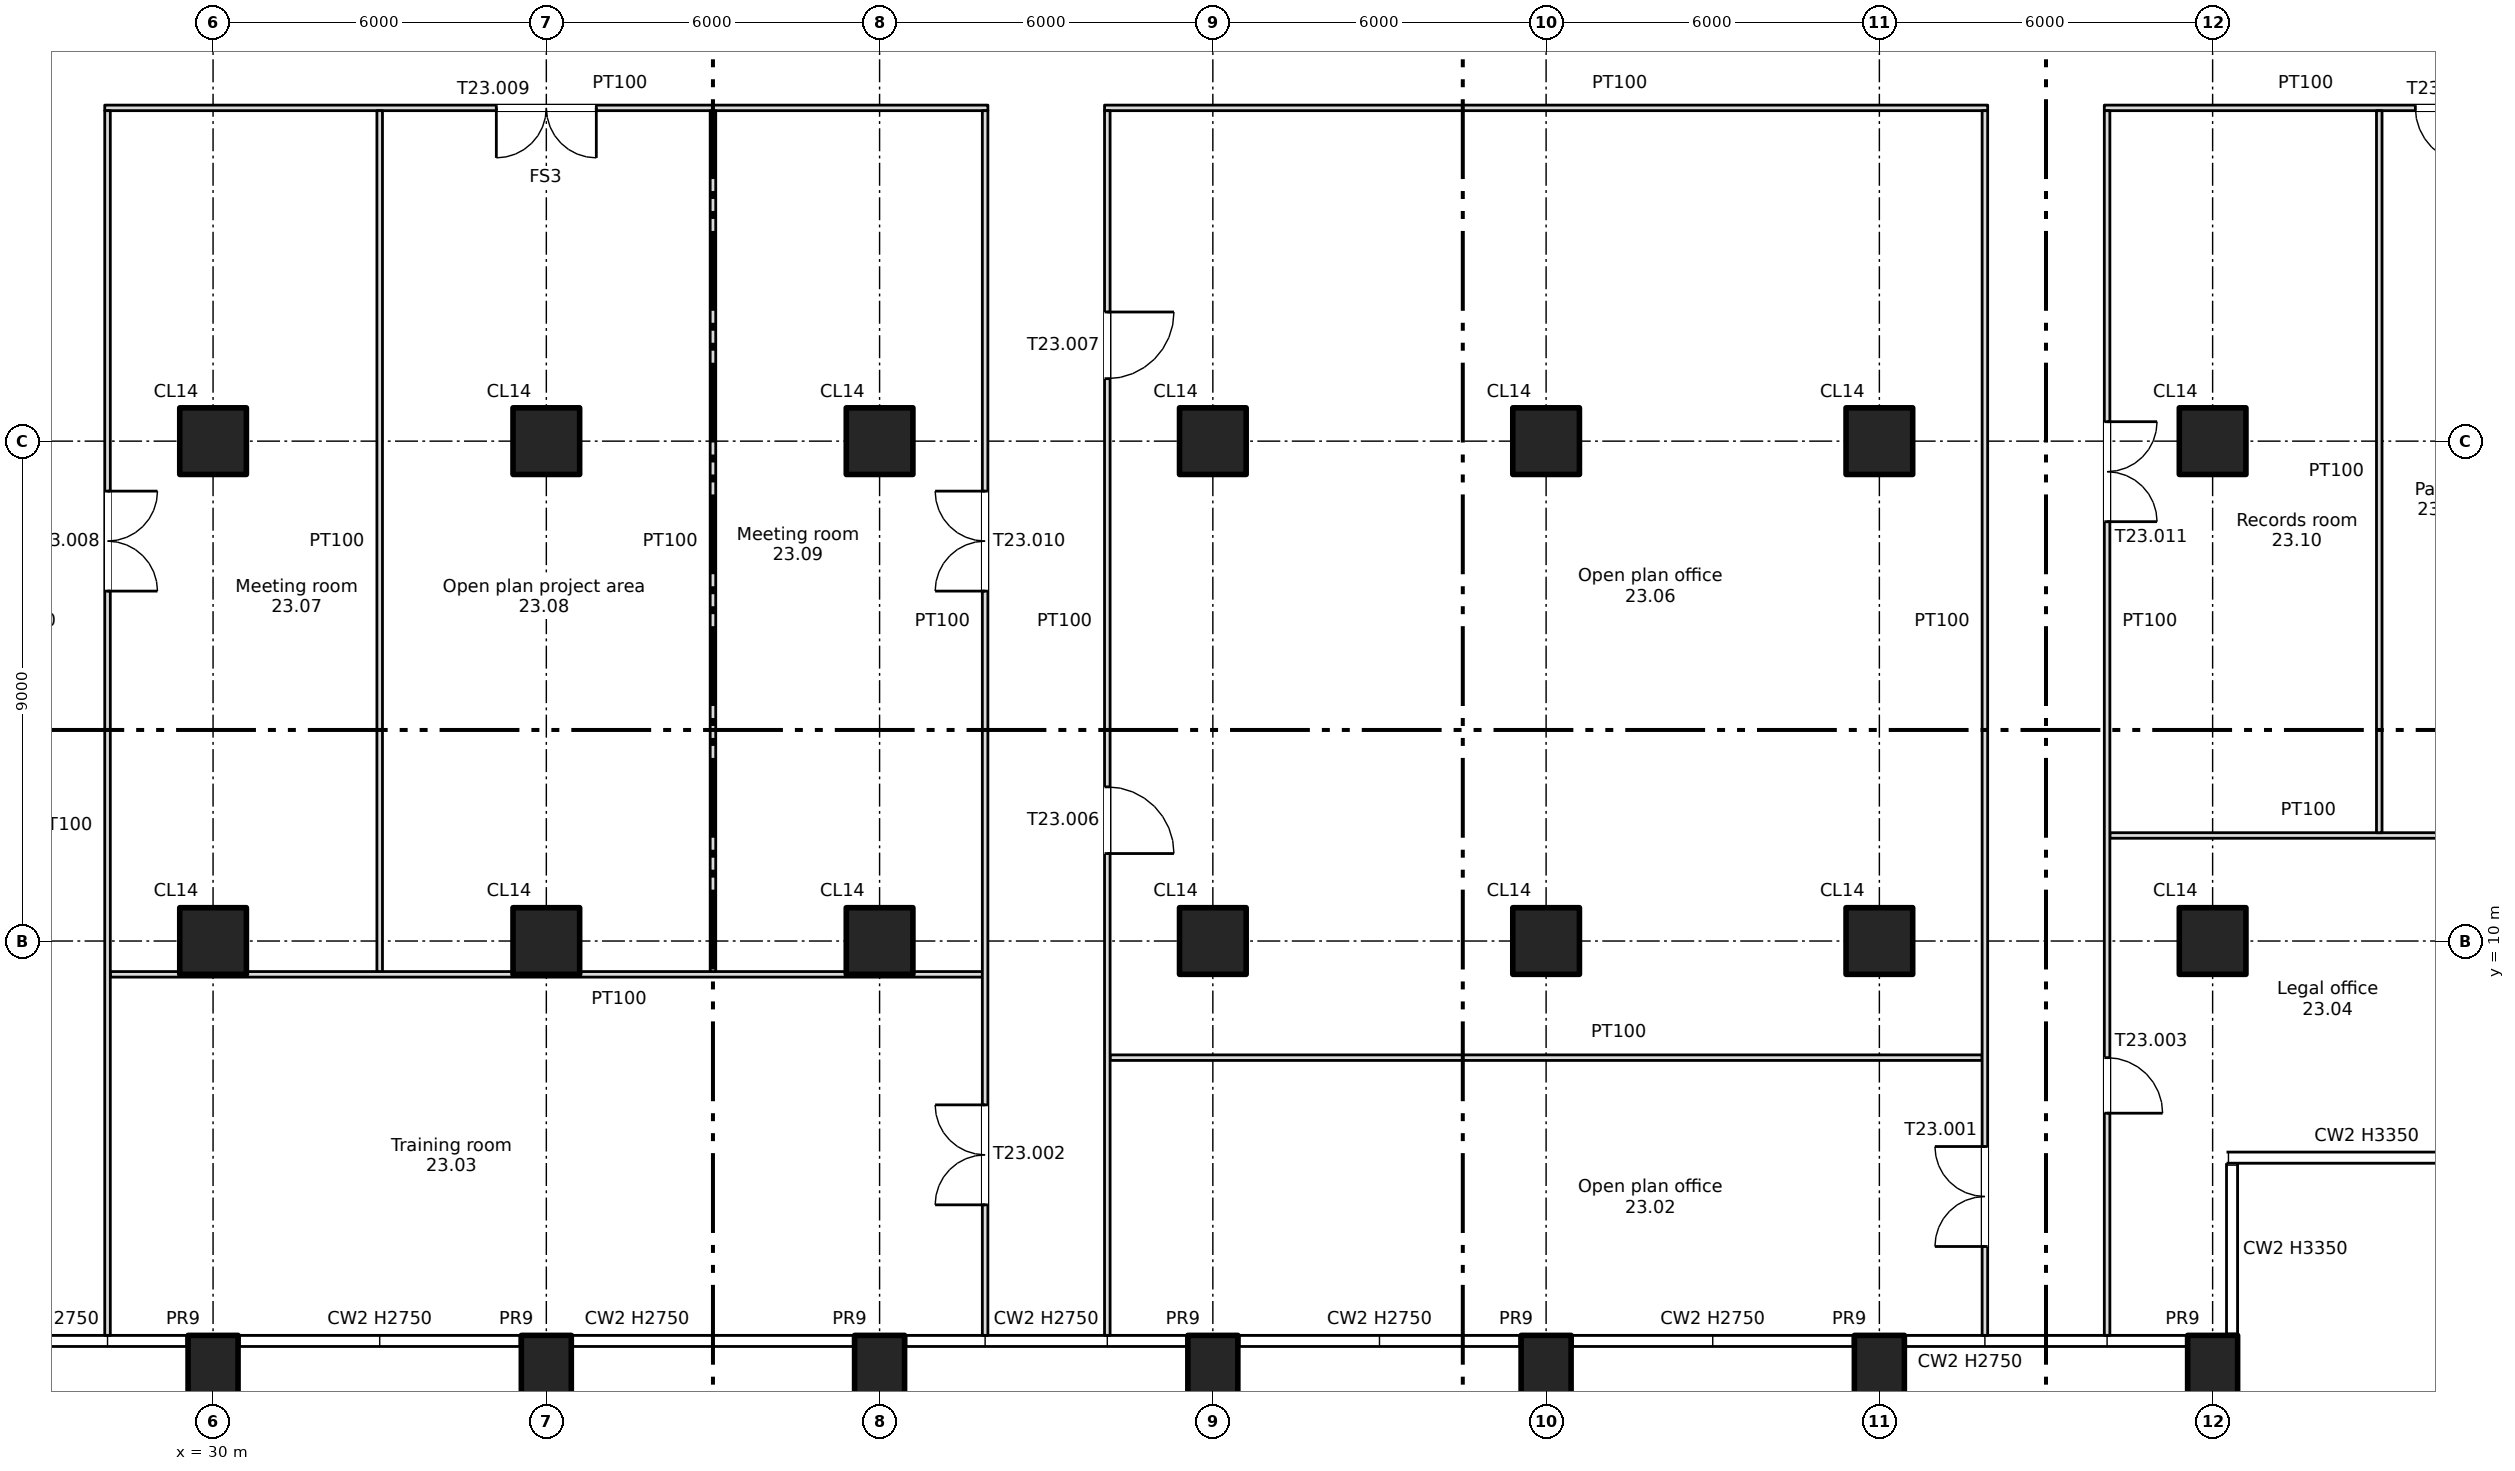
"""IFC4 building model, lengths in metres.
Left out: names, types, materials, properties, quantities, classifications, styles, units other than length and angle.
Written with IfcOpenShell. Run it as: python <this file> out.ifc"""

import sys

from ifc_helpers import new_model, si_unit, direction, frame, frame_2d, origin, origin_2d, place, context, subcontext, project, spatial, rectangle, extrude, element, fill, save


model = new_model("IFC4")
c1 = context("Model", 3, precision=1e-05, world=origin(), true_north=direction((0.0, 1.0)))
c2 = subcontext(c1, "Body", "Model", "MODEL_VIEW")
j1 = project(units=[si_unit("LENGTHUNIT", "METRE"), si_unit("PLANEANGLEUNIT", "RADIAN")], contexts=[c1])
p1 = place(None, origin())
s1 = spatial("IfcSite", under=j1, at=p1, CompositionType="ELEMENT")
p2 = place(p1, origin())
s2 = spatial("IfcBuilding", under=s1, at=p2, CompositionType="ELEMENT")
p3 = place(p2, frame((0.0, 0.0, 151.25)))
s3 = spatial("IfcBuildingStorey", under=s2, at=p3, CompositionType="ELEMENT", Elevation=151.25)
for number, where, z_axis, x_axis in (
    (1, (30.0, 2.2, -0.4), (0.0, 0.0, 1.0), (1.0, 0.0, 0.0)),
    (2, (36.0, 2.2, -0.4), (0.0, 0.0, 1.0), (1.0, 0.0, 0.0)),
    (3, (42.0, 2.2, -0.4), (0.0, 0.0, 1.0), (1.0, 0.0, 0.0)),
    (4, (48.0, 2.2, -0.4), (0.0, 0.0, 1.0), (1.0, 0.0, 0.0)),
    (5, (54.0, 2.2, -0.4), (0.0, 0.0, 1.0), (1.0, 0.0, 0.0)),
    (6, (60.0, 2.2, -0.4), (0.0, 0.0, 1.0), (1.0, 0.0, 0.0)),
    (7, (66.0, 2.2, -0.4), (0.0, 0.0, 1.0), (1.0, 0.0, 0.0)),
):
    element("IfcColumn", number, at=place(p3, frame(where, z_axis=z_axis, x_axis=x_axis)), inside=s3, PredefinedType="COLUMN", context=c2, shape_type="SweptSolid", body=[
        extrude(rectangle(XDim=0.9, YDim=1.4, at=origin_2d()), origin(), (0.0, 0.0, 1.0), 3.75),
    ])
for number, where, z_axis, x_axis in (
    (8, (30.0, 10.0, 0.0), (0.0, 0.0, 1.0), (1.0, 0.0, 0.0)),
    (9, (30.0, 19.0, 0.0), (0.0, 0.0, 1.0), (1.0, 0.0, 0.0)),
    (10, (36.0, 10.0, 0.0), (0.0, 0.0, 1.0), (1.0, 0.0, 0.0)),
    (11, (36.0, 19.0, 0.0), (0.0, 0.0, 1.0), (1.0, 0.0, 0.0)),
    (12, (42.0, 10.0, 0.0), (0.0, 0.0, 1.0), (1.0, 0.0, 0.0)),
    (13, (42.0, 19.0, 0.0), (0.0, 0.0, 1.0), (1.0, 0.0, 0.0)),
    (14, (48.0, 10.0, 0.0), (0.0, 0.0, 1.0), (1.0, 0.0, 0.0)),
    (15, (48.0, 19.0, 0.0), (0.0, 0.0, 1.0), (1.0, 0.0, 0.0)),
    (16, (54.0, 10.0, 0.0), (0.0, 0.0, 1.0), (1.0, 0.0, 0.0)),
    (17, (54.0, 19.0, 0.0), (0.0, 0.0, 1.0), (1.0, 0.0, 0.0)),
    (18, (60.0, 10.0, 0.0), (0.0, 0.0, 1.0), (1.0, 0.0, 0.0)),
    (19, (60.0, 19.0, 0.0), (0.0, 0.0, 1.0), (1.0, 0.0, 0.0)),
    (20, (66.0, 10.0, 0.0), (0.0, 0.0, 1.0), (1.0, 0.0, 0.0)),
    (21, (66.0, 19.0, 0.0), (0.0, 0.0, 1.0), (1.0, 0.0, 0.0)),
):
    element("IfcColumn", number, at=place(p3, frame(where, z_axis=z_axis, x_axis=x_axis)), inside=s3, PredefinedType="COLUMN", context=c2, shape_type="SweptSolid", body=[
        extrude(rectangle(XDim=1.2, YDim=1.2, at=origin_2d()), origin(), (0.0, 0.0, 1.0), 3.35),
    ])
for number, where, z_axis, x_axis in (
    (22, (46.15, 7.9, 0.0), (0.0, 0.0, 1.0), (1.0, 0.0, 0.0)),
    (23, (28.15, 9.4, 0.0), (0.0, 0.0, 1.0), (1.0, 0.0, 0.0)),
):
    element("IfcWall", number, at=place(p3, frame(where, z_axis=z_axis, x_axis=x_axis)), inside=s3, PredefinedType="PARTITIONING", context=c2, shape_type="SweptSolid", body=[
        extrude(rectangle(XDim=15.7, YDim=0.1, at=frame_2d((7.85, 0.0))), origin(), (0.0, 0.0, 1.0), 3.35),
    ])
p4 = place(p3, frame((64.15, 11.9, 0.0), z_axis=(0.0, 0.0, 1.0), x_axis=(1.0, 0.0, 0.0)))
e24 = element("IfcWall", 24, at=p4, inside=s3, PredefinedType="PARTITIONING", context=c2, shape_type="SweptSolid", body=[
    extrude(rectangle(XDim=7.15, YDim=0.1, at=frame_2d((3.575, 0.0))), origin(), (0.0, 0.0, 1.0), 3.35),
])
p5 = place(p3, frame((28.05, 25.0, 0.0), z_axis=(0.0, 0.0, 1.0), x_axis=(1.0, 0.0, 0.0)))
e25 = element("IfcWall", 25, at=p5, inside=s3, PredefinedType="PARTITIONING", context=c2, shape_type="SweptSolid", body=[
    extrude(rectangle(XDim=15.9, YDim=0.1, at=frame_2d((7.95, 0.0))), origin(), (0.0, 0.0, 1.0), 3.35),
])
p6 = place(p5, frame((7.05, 0.0, 0.0)))
e26 = element("IfcOpeningElement", 26, at=p6, cuts=e25, PredefinedType="OPENING", context=c2, shape_type="SweptSolid", body=[
    extrude(rectangle(XDim=1.8, YDim=2.1, at=frame_2d((0.9, 1.05))), frame((0.0, 0.06, 0.0), z_axis=(0.0, -1.0, 0.0), x_axis=(1.0, 0.0, 0.0)), (0.0, 0.0, 1.0), 0.12),
])
p7 = place(p3, frame((46.05, 25.0, 0.0), z_axis=(0.0, 0.0, 1.0), x_axis=(1.0, 0.0, 0.0)))
e27 = element("IfcWall", 27, at=p7, inside=s3, PredefinedType="PARTITIONING", context=c2, shape_type="SweptSolid", body=[
    extrude(rectangle(XDim=15.9, YDim=0.1, at=frame_2d((7.95, 0.0))), origin(), (0.0, 0.0, 1.0), 3.35),
])
p8 = place(p3, frame((64.05, 25.0, 0.0), z_axis=(0.0, 0.0, 1.0), x_axis=(1.0, 0.0, 0.0)))
e28 = element("IfcWall", 28, at=p8, inside=s3, PredefinedType="PARTITIONING", context=c2, shape_type="SweptSolid", body=[
    extrude(rectangle(XDim=7.25, YDim=0.1, at=frame_2d((3.625, 0.0))), origin(), (0.0, 0.0, 1.0), 3.35),
])
p9 = place(p8, frame((5.6, 0.0, 0.0)))
e29 = element("IfcOpeningElement", 29, at=p9, cuts=e28, PredefinedType="OPENING", context=c2, shape_type="SweptSolid", body=[
    extrude(rectangle(XDim=1.0, YDim=2.1, at=frame_2d((0.5, 1.05))), frame((0.0, 0.06, 0.0), z_axis=(0.0, -1.0, 0.0), x_axis=(1.0, 0.0, 0.0)), (0.0, 0.0, 1.0), 0.12),
])
p10 = place(p3, frame((28.1, 2.9, 0.0), z_axis=(0.0, 0.0, 1.0), x_axis=(0.0, 1.0, 0.0)))
e30 = element("IfcWall", 30, at=p10, inside=s3, PredefinedType="PARTITIONING", context=c2, shape_type="SweptSolid", body=[
    extrude(rectangle(XDim=22.05, YDim=0.1, at=frame_2d((11.025, 0.0))), origin(), (0.0, 0.0, 1.0), 3.35),
])
p11 = place(p10, frame((13.4, 0.0, 0.0)))
e31 = element("IfcOpeningElement", 31, at=p11, cuts=e30, PredefinedType="OPENING", context=c2, shape_type="SweptSolid", body=[
    extrude(rectangle(XDim=1.8, YDim=2.1, at=frame_2d((0.9, 1.05))), frame((0.0, 0.06, 0.0), z_axis=(0.0, -1.0, 0.0), x_axis=(1.0, 0.0, 0.0)), (0.0, 0.0, 1.0), 0.12),
])
for number, where, z_axis, x_axis in (
    (32, (33.0, 9.45, 0.0), (0.0, 0.0, 1.0), (0.0, 1.0, 0.0)),
    (33, (39.0, 9.45, 0.0), (0.0, 0.0, 1.0), (0.0, 1.0, 0.0)),
):
    element("IfcWall", number, at=place(p3, frame(where, z_axis=z_axis, x_axis=x_axis)), inside=s3, PredefinedType="PARTITIONING", context=c2, shape_type="SweptSolid", body=[
        extrude(rectangle(XDim=15.5, YDim=0.1, at=frame_2d((7.75, 0.0))), origin(), (0.0, 0.0, 1.0), 3.35),
    ])
p12 = place(p3, frame((43.9, 2.9, 0.0), z_axis=(0.0, 0.0, 1.0), x_axis=(0.0, 1.0, 0.0)))
e34 = element("IfcWall", 34, at=p12, inside=s3, PredefinedType="PARTITIONING", context=c2, shape_type="SweptSolid", body=[
    extrude(rectangle(XDim=22.05, YDim=0.1, at=frame_2d((11.025, 0.0))), origin(), (0.0, 0.0, 1.0), 3.35),
])
p13 = place(p12, frame((2.35, 0.0, 0.0)))
e35 = element("IfcOpeningElement", 35, at=p13, cuts=e34, PredefinedType="OPENING", context=c2, shape_type="SweptSolid", body=[
    extrude(rectangle(XDim=1.8, YDim=2.1, at=frame_2d((0.9, 1.05))), frame((0.0, 0.06, 0.0), z_axis=(0.0, -1.0, 0.0), x_axis=(1.0, 0.0, 0.0)), (0.0, 0.0, 1.0), 0.12),
])
p14 = place(p12, frame((13.4, 0.0, 0.0)))
e36 = element("IfcOpeningElement", 36, at=p14, cuts=e34, PredefinedType="OPENING", context=c2, shape_type="SweptSolid", body=[
    extrude(rectangle(XDim=1.8, YDim=2.1, at=frame_2d((0.9, 1.05))), frame((0.0, 0.06, 0.0), z_axis=(0.0, -1.0, 0.0), x_axis=(1.0, 0.0, 0.0)), (0.0, 0.0, 1.0), 0.12),
])
p15 = place(p3, frame((46.1, 2.9, 0.0), z_axis=(0.0, 0.0, 1.0), x_axis=(0.0, 1.0, 0.0)))
e37 = element("IfcWall", 37, at=p15, inside=s3, PredefinedType="PARTITIONING", context=c2, shape_type="SweptSolid", body=[
    extrude(rectangle(XDim=22.05, YDim=0.1, at=frame_2d((11.025, 0.0))), origin(), (0.0, 0.0, 1.0), 3.35),
])
p16 = place(p15, frame((8.675, 0.0, 0.0)))
e38 = element("IfcOpeningElement", 38, at=p16, cuts=e37, PredefinedType="OPENING", context=c2, shape_type="SweptSolid", body=[
    extrude(rectangle(XDim=1.2, YDim=2.1, at=frame_2d((0.6, 1.05))), frame((0.0, 0.06, 0.0), z_axis=(0.0, -1.0, 0.0), x_axis=(1.0, 0.0, 0.0)), (0.0, 0.0, 1.0), 0.12),
])
p17 = place(p15, frame((17.225, 0.0, 0.0)))
e39 = element("IfcOpeningElement", 39, at=p17, cuts=e37, PredefinedType="OPENING", context=c2, shape_type="SweptSolid", body=[
    extrude(rectangle(XDim=1.2, YDim=2.1, at=frame_2d((0.6, 1.05))), frame((0.0, 0.06, 0.0), z_axis=(0.0, -1.0, 0.0), x_axis=(1.0, 0.0, 0.0)), (0.0, 0.0, 1.0), 0.12),
])
p18 = place(p3, frame((61.9, 2.9, 0.0), z_axis=(0.0, 0.0, 1.0), x_axis=(0.0, 1.0, 0.0)))
e40 = element("IfcWall", 40, at=p18, inside=s3, PredefinedType="PARTITIONING", context=c2, shape_type="SweptSolid", body=[
    extrude(rectangle(XDim=22.05, YDim=0.1, at=frame_2d((11.025, 0.0))), origin(), (0.0, 0.0, 1.0), 3.35),
])
p19 = place(p18, frame((1.6, 0.0, 0.0)))
e41 = element("IfcOpeningElement", 41, at=p19, cuts=e40, PredefinedType="OPENING", context=c2, shape_type="SweptSolid", body=[
    extrude(rectangle(XDim=1.8, YDim=2.1, at=frame_2d((0.9, 1.05))), frame((0.0, 0.06, 0.0), z_axis=(0.0, -1.0, 0.0), x_axis=(1.0, 0.0, 0.0)), (0.0, 0.0, 1.0), 0.12),
])
p20 = place(p3, frame((64.1, 2.9, 0.0), z_axis=(0.0, 0.0, 1.0), x_axis=(0.0, 1.0, 0.0)))
e42 = element("IfcWall", 42, at=p20, inside=s3, PredefinedType="PARTITIONING", context=c2, shape_type="SweptSolid", body=[
    extrude(rectangle(XDim=22.05, YDim=0.1, at=frame_2d((11.025, 0.0))), origin(), (0.0, 0.0, 1.0), 3.35),
])
p21 = place(p20, frame((4.0, 0.0, 0.0)))
e43 = element("IfcOpeningElement", 43, at=p21, cuts=e42, PredefinedType="OPENING", context=c2, shape_type="SweptSolid", body=[
    extrude(rectangle(XDim=1.0, YDim=2.1, at=frame_2d((0.5, 1.05))), frame((0.0, 0.06, 0.0), z_axis=(0.0, -1.0, 0.0), x_axis=(1.0, 0.0, 0.0)), (0.0, 0.0, 1.0), 0.12),
])
p22 = place(p20, frame((14.65, 0.0, 0.0)))
e44 = element("IfcOpeningElement", 44, at=p22, cuts=e42, PredefinedType="OPENING", context=c2, shape_type="SweptSolid", body=[
    extrude(rectangle(XDim=1.8, YDim=2.1, at=frame_2d((0.9, 1.05))), frame((0.0, 0.06, 0.0), z_axis=(0.0, -1.0, 0.0), x_axis=(1.0, 0.0, 0.0)), (0.0, 0.0, 1.0), 0.12),
])
p23 = place(p3, frame((69.0, 11.95, 0.0), z_axis=(0.0, 0.0, 1.0), x_axis=(0.0, 1.0, 0.0)))
e45 = element("IfcWall", 45, at=p23, inside=s3, PredefinedType="PARTITIONING", context=c2, shape_type="SweptSolid", body=[
    extrude(rectangle(XDim=13.0, YDim=0.1, at=frame_2d((6.5, 0.0))), origin(), (0.0, 0.0, 1.0), 3.35),
])
p24 = place(p19, origin())
e46 = element("IfcDoor", 46, at=p24, inside=s3, OperationType="DOUBLE_DOOR_SINGLE_SWING", PredefinedType="DOOR", context=c2, shape_type="SweptSolid", body=[
    extrude(rectangle(XDim=1.8, YDim=2.1, at=frame_2d((0.9, 1.05))), frame((0.0, 0.025, 0.0), z_axis=(0.0, -1.0, 0.0), x_axis=(1.0, 0.0, 0.0)), (0.0, 0.0, 1.0), 0.05),
])
fill(e41, e46)
p25 = place(p13, origin())
e47 = element("IfcDoor", 47, at=p25, inside=s3, OperationType="DOUBLE_DOOR_SINGLE_SWING", PredefinedType="DOOR", context=c2, shape_type="SweptSolid", body=[
    extrude(rectangle(XDim=1.8, YDim=2.1, at=frame_2d((0.9, 1.05))), frame((0.0, 0.025, 0.0), z_axis=(0.0, -1.0, 0.0), x_axis=(1.0, 0.0, 0.0)), (0.0, 0.0, 1.0), 0.05),
])
fill(e35, e47)
p26 = place(p21, origin())
e48 = element("IfcDoor", 48, at=p26, inside=s3, OperationType="SINGLE_SWING_LEFT", PredefinedType="DOOR", context=c2, shape_type="SweptSolid", body=[
    extrude(rectangle(XDim=1.0, YDim=2.1, at=frame_2d((0.5, 1.05))), frame((0.0, 0.025, 0.0), z_axis=(0.0, -1.0, 0.0), x_axis=(1.0, 0.0, 0.0)), (0.0, 0.0, 1.0), 0.05),
])
fill(e43, e48)
p27 = place(p16, origin())
e49 = element("IfcDoor", 49, at=p27, inside=s3, OperationType="SINGLE_SWING_LEFT", PredefinedType="DOOR", context=c2, shape_type="SweptSolid", body=[
    extrude(rectangle(XDim=1.2, YDim=2.1, at=frame_2d((0.6, 1.05))), frame((0.0, 0.025, 0.0), z_axis=(0.0, -1.0, 0.0), x_axis=(1.0, 0.0, 0.0)), (0.0, 0.0, 1.0), 0.05),
])
fill(e38, e49)
p28 = place(p17, origin())
e50 = element("IfcDoor", 50, at=p28, inside=s3, OperationType="SINGLE_SWING_RIGHT", PredefinedType="DOOR", context=c2, shape_type="SweptSolid", body=[
    extrude(rectangle(XDim=1.2, YDim=2.1, at=frame_2d((0.6, 1.05))), frame((0.0, 0.025, 0.0), z_axis=(0.0, -1.0, 0.0), x_axis=(1.0, 0.0, 0.0)), (0.0, 0.0, 1.0), 0.05),
])
fill(e39, e50)
p29 = place(p11, origin())
e51 = element("IfcDoor", 51, at=p29, inside=s3, OperationType="DOUBLE_DOOR_SINGLE_SWING", PredefinedType="DOOR", context=c2, shape_type="SweptSolid", body=[
    extrude(rectangle(XDim=1.8, YDim=2.1, at=frame_2d((0.9, 1.05))), frame((0.0, 0.025, 0.0), z_axis=(0.0, -1.0, 0.0), x_axis=(1.0, 0.0, 0.0)), (0.0, 0.0, 1.0), 0.05),
])
fill(e31, e51)
p30 = place(p6, origin())
e52 = element("IfcDoor", 52, at=p30, inside=s3, OperationType="DOUBLE_DOOR_SINGLE_SWING", PredefinedType="DOOR", context=c2, shape_type="SweptSolid", body=[
    extrude(rectangle(XDim=1.8, YDim=2.1, at=frame_2d((0.9, 1.05))), frame((0.0, 0.025, 0.0), z_axis=(0.0, -1.0, 0.0), x_axis=(1.0, 0.0, 0.0)), (0.0, 0.0, 1.0), 0.05),
])
fill(e26, e52)
p31 = place(p14, origin())
e53 = element("IfcDoor", 53, at=p31, inside=s3, OperationType="DOUBLE_DOOR_SINGLE_SWING", PredefinedType="DOOR", context=c2, shape_type="SweptSolid", body=[
    extrude(rectangle(XDim=1.8, YDim=2.1, at=frame_2d((0.9, 1.05))), frame((0.0, 0.025, 0.0), z_axis=(0.0, -1.0, 0.0), x_axis=(1.0, 0.0, 0.0)), (0.0, 0.0, 1.0), 0.05),
])
fill(e36, e53)
p32 = place(p22, origin())
e54 = element("IfcDoor", 54, at=p32, inside=s3, OperationType="DOUBLE_DOOR_SINGLE_SWING", PredefinedType="DOOR", context=c2, shape_type="SweptSolid", body=[
    extrude(rectangle(XDim=1.8, YDim=2.1, at=frame_2d((0.9, 1.05))), frame((0.0, 0.025, 0.0), z_axis=(0.0, -1.0, 0.0), x_axis=(1.0, 0.0, 0.0)), (0.0, 0.0, 1.0), 0.05),
])
fill(e44, e54)
p33 = place(p9, origin())
e55 = element("IfcDoor", 55, at=p33, inside=s3, OperationType="SINGLE_SWING_RIGHT", PredefinedType="DOOR", context=c2, shape_type="SweptSolid", body=[
    extrude(rectangle(XDim=1.0, YDim=2.1, at=frame_2d((0.5, 1.05))), frame((0.0, 0.025, 0.0), z_axis=(0.0, -1.0, 0.0), x_axis=(1.0, 0.0, 0.0)), (0.0, 0.0, 1.0), 0.05),
])
fill(e29, e55)
save(model, sys.argv[1])
